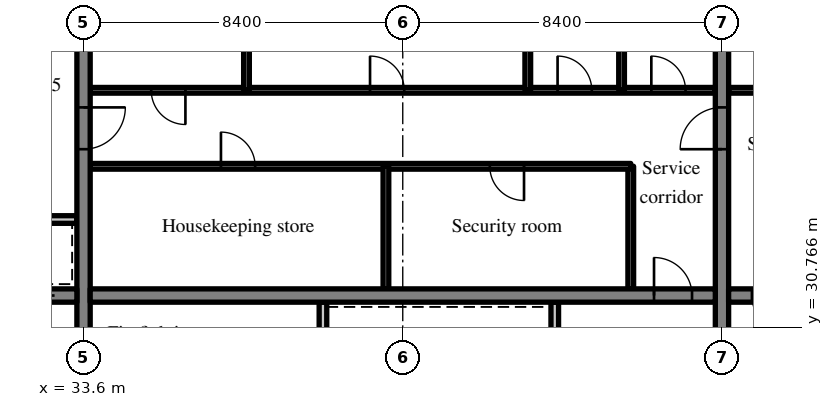
"""IFC4 building model, lengths in metres.
Left out: names, types, materials, properties, quantities, classifications, styles, units other than length and angle.
Written with IfcOpenShell. Run it as: python <this file> out.ifc"""

import sys

from ifc_helpers import new_model, si_unit, direction, frame, frame_2d, origin, place, context, subcontext, project, spatial, rectangle, extrude, source, transform, mapped, element, fill, save


model = new_model("IFC4")
c1 = context("Model", 3, precision=1e-05, world=origin(), true_north=direction((0.0, 1.0)))
c2 = subcontext(c1, "Body", "Model", "MODEL_VIEW")
j1 = project(units=[si_unit("LENGTHUNIT", "METRE"), si_unit("PLANEANGLEUNIT", "RADIAN")], contexts=[c1])
p1 = place(None, origin())
s1 = spatial("IfcSite", under=j1, at=p1, CompositionType="ELEMENT")
p2 = place(p1, origin())
s2 = spatial("IfcBuilding", under=s1, at=p2, CompositionType="ELEMENT")
p3 = place(p2, frame((0.0, 0.0, 229.6)))
s3 = spatial("IfcBuildingStorey", under=s2, at=p3, CompositionType="ELEMENT", Elevation=229.6)
m1 = source(origin(), c2, "Body", "SweptSolid", [
    extrude(rectangle(XDim=18.8, YDim=0.35, at=frame_2d((9.4, 0.0))), origin(), (0.0, 0.0, 1.0), 3.62),
])
p4 = place(p3, frame((33.6, 22.6, 0.0), z_axis=(0.0, 0.0, 1.0), x_axis=(0.0, 1.0, 0.0)))
e1 = element("IfcWall", 1, at=p4, inside=s3, PredefinedType="SHEAR", context=c2, shape_type="MappedRepresentation", body=[
    mapped(m1, transform((0.0, 0.0, 0.0), scale=1.0)),
])
m2 = source(origin(), c2, "Body", "SweptSolid", [
    extrude(rectangle(XDim=1.1, YDim=2.1, at=frame_2d((0.55, 1.05))), frame((0.0, 0.185, 0.0), z_axis=(0.0, -1.0, 0.0), x_axis=(1.0, 0.0, 0.0)), (0.0, 0.0, 1.0), 0.37),
])
p5 = place(p4, frame((12.85, 0.0, 0.0)))
e2 = element("IfcOpeningElement", 2, at=p5, cuts=e1, PredefinedType="OPENING", context=c2, shape_type="MappedRepresentation", body=[
    mapped(m2, transform((0.0, 0.0, 0.0), scale=1.0)),
])
p6 = place(p3, frame((50.4, 22.6, 0.0), z_axis=(0.0, 0.0, 1.0), x_axis=(0.0, 1.0, 0.0)))
e3 = element("IfcWall", 3, at=p6, inside=s3, PredefinedType="SHEAR", context=c2, shape_type="MappedRepresentation", body=[
    mapped(m1, transform((0.0, 0.0, 0.0), scale=1.0)),
])
p7 = place(p6, frame((12.85, 0.0, 0.0)))
e4 = element("IfcOpeningElement", 4, at=p7, cuts=e3, PredefinedType="OPENING", context=c2, shape_type="MappedRepresentation", body=[
    mapped(m2, transform((0.0, 0.0, 0.0), scale=1.0)),
])
m3 = source(origin(), c2, "Body", "SweptSolid", [
    extrude(rectangle(XDim=7.625, YDim=0.35, at=frame_2d((3.812, 0.0))), origin(), (0.0, 0.0, 1.0), 3.62),
])
p8 = place(p3, frame((25.8, 31.6, 0.0), z_axis=(0.0, 0.0, 1.0), x_axis=(1.0, 0.0, 0.0)))
e5 = element("IfcWall", 5, at=p8, inside=s3, PredefinedType="SHEAR", context=c2, shape_type="MappedRepresentation", body=[
    mapped(m3, transform((0.0, 0.0, 0.0), scale=1.0)),
])
p9 = place(p8, frame((5.938, 0.0, 0.0)))
e6 = element("IfcOpeningElement", 6, at=p9, cuts=e5, PredefinedType="OPENING", context=c2, shape_type="MappedRepresentation", body=[
    mapped(m2, transform((0.0, 0.0, 0.0), scale=1.0)),
])
m4 = source(origin(), c2, "Body", "SweptSolid", [
    extrude(rectangle(XDim=16.45, YDim=0.35, at=frame_2d((8.225, 0.0))), origin(), (0.0, 0.0, 1.0), 3.62),
])
p10 = place(p3, frame((33.775, 31.6, 0.0), z_axis=(0.0, 0.0, 1.0), x_axis=(1.0, 0.0, 0.0)))
e7 = element("IfcWall", 7, at=p10, inside=s3, PredefinedType="SHEAR", context=c2, shape_type="MappedRepresentation", body=[
    mapped(m4, transform((0.0, 0.0, 0.0), scale=1.0)),
])
m5 = source(origin(), c2, "Body", "SweptSolid", [
    extrude(rectangle(XDim=1.0, YDim=2.1, at=frame_2d((0.5, 1.05))), frame((0.0, 0.185, 0.0), z_axis=(0.0, -1.0, 0.0), x_axis=(1.0, 0.0, 0.0)), (0.0, 0.0, 1.0), 0.37),
])
p11 = place(p10, frame((14.837, 0.0, 0.0)))
e8 = element("IfcOpeningElement", 8, at=p11, cuts=e7, PredefinedType="OPENING", context=c2, shape_type="MappedRepresentation", body=[
    mapped(m5, transform((0.0, 0.0, 0.0), scale=1.0)),
])
m6 = source(origin(), c2, "Body", "SweptSolid", [
    extrude(rectangle(XDim=16.45, YDim=0.35, at=frame_2d((8.225, 0.0))), origin(), (0.0, 0.0, 1.0), 3.62),
])
p12 = place(p3, frame((50.575, 31.6, 0.0), z_axis=(0.0, 0.0, 1.0), x_axis=(1.0, 0.0, 0.0)))
e9 = element("IfcWall", 9, at=p12, inside=s3, PredefinedType="SHEAR", context=c2, shape_type="MappedRepresentation", body=[
    mapped(m6, transform((0.0, 0.0, 0.0), scale=1.0)),
])
p13 = place(p12, frame((0.613, 0.0, 0.0)))
e10 = element("IfcOpeningElement", 10, at=p13, cuts=e9, PredefinedType="OPENING", context=c2, shape_type="MappedRepresentation", body=[
    mapped(m5, transform((0.0, 0.0, 0.0), scale=1.0)),
])
m7 = source(origin(), c2, "Body", "SweptSolid", [
    extrude(rectangle(XDim=8.825, YDim=0.2, at=frame_2d((4.413, 0.0))), origin(), (0.0, 0.0, 1.0), 3.62),
])
p14 = place(p3, frame((39.9, 22.6, 0.0), z_axis=(0.0, 0.0, 1.0), x_axis=(0.0, 1.0, 0.0)))
e11 = element("IfcWall", 11, at=p14, inside=s3, PredefinedType="PARTITIONING", context=c2, shape_type="MappedRepresentation", body=[
    mapped(m7, transform((0.0, 0.0, 0.0), scale=1.0)),
])
m8 = source(origin(), c2, "Body", "SweptSolid", [
    extrude(rectangle(XDim=0.9, YDim=2.1, at=frame_2d((0.45, 1.05))), frame((0.0, 0.11, 0.0), z_axis=(0.0, -1.0, 0.0), x_axis=(1.0, 0.0, 0.0)), (0.0, 0.0, 1.0), 0.22),
])
p15 = place(p14, frame((4.95, 0.0, 0.0)))
e12 = element("IfcOpeningElement", 12, at=p15, cuts=e11, PredefinedType="OPENING", context=c2, shape_type="MappedRepresentation", body=[
    mapped(m8, transform((0.0, 0.0, 0.0), scale=1.0)),
])
m9 = source(origin(), c2, "Body", "SweptSolid", [
    extrude(rectangle(XDim=2.625, YDim=0.2, at=frame_2d((1.312, 0.0))), origin(), (0.0, 0.0, 1.0), 3.62),
])
p16 = place(p3, frame((46.0, 28.8, 0.0), z_axis=(0.0, 0.0, 1.0), x_axis=(0.0, 1.0, 0.0)))
e13 = element("IfcWall", 13, at=p16, inside=s3, PredefinedType="SOLIDWALL", context=c2, shape_type="MappedRepresentation", body=[
    mapped(m9, transform((0.0, 0.0, 0.0), scale=1.0)),
])
m10 = source(origin(), c2, "Body", "SweptSolid", [
    extrude(rectangle(XDim=3.225, YDim=0.15, at=frame_2d((1.613, 0.0))), origin(), (0.0, 0.0, 1.0), 3.62),
])
p17 = place(p3, frame((48.0, 31.775, 0.0), z_axis=(0.0, 0.0, 1.0), x_axis=(0.0, 1.0, 0.0)))
e14 = element("IfcWall", 14, at=p17, inside=s3, PredefinedType="PARTITIONING", context=c2, shape_type="MappedRepresentation", body=[
    mapped(m10, transform((0.0, 0.0, 0.0), scale=1.0)),
])
m11 = source(origin(), c2, "Body", "SweptSolid", [
    extrude(rectangle(XDim=14.225, YDim=0.15, at=frame_2d((7.113, 0.0))), origin(), (0.0, 0.0, 1.0), 3.62),
])
p18 = place(p3, frame((33.775, 35.0, 0.0), z_axis=(0.0, 0.0, 1.0), x_axis=(1.0, 0.0, 0.0)))
e15 = element("IfcWall", 15, at=p18, inside=s3, PredefinedType="PARTITIONING", context=c2, shape_type="MappedRepresentation", body=[
    mapped(m11, transform((0.0, 0.0, 0.0), scale=1.0)),
])
m12 = source(origin(), c2, "Body", "SweptSolid", [
    extrude(rectangle(XDim=0.9, YDim=2.1, at=frame_2d((0.45, 1.05))), frame((0.0, 0.085, 0.0), z_axis=(0.0, -1.0, 0.0), x_axis=(1.0, 0.0, 0.0)), (0.0, 0.0, 1.0), 0.17),
])
p19 = place(p18, frame((3.441, 0.0, 0.0)))
e16 = element("IfcOpeningElement", 16, at=p19, cuts=e15, PredefinedType="OPENING", context=c2, shape_type="MappedRepresentation", body=[
    mapped(m12, transform((0.0, 0.0, 0.0), scale=1.0)),
])
p20 = place(p18, frame((10.516, 0.0, 0.0)))
e17 = element("IfcOpeningElement", 17, at=p20, cuts=e15, PredefinedType="OPENING", context=c2, shape_type="MappedRepresentation", body=[
    mapped(m12, transform((0.0, 0.0, 0.0), scale=1.0)),
])
m13 = source(origin(), c2, "Body", "SweptSolid", [
    extrude(rectangle(XDim=16.45, YDim=0.15, at=frame_2d((8.225, 0.0))), origin(), (0.0, 0.0, 1.0), 3.62),
])
p21 = place(p3, frame((33.775, 37.0, 0.0), z_axis=(0.0, 0.0, 1.0), x_axis=(1.0, 0.0, 0.0)))
e18 = element("IfcWall", 18, at=p21, inside=s3, PredefinedType="PARTITIONING", context=c2, shape_type="MappedRepresentation", body=[
    mapped(m13, transform((0.0, 0.0, 0.0), scale=1.0)),
])
p22 = place(p21, frame((1.606, 0.0, 0.0)))
e19 = element("IfcOpeningElement", 19, at=p22, cuts=e18, PredefinedType="OPENING", context=c2, shape_type="MappedRepresentation", body=[
    mapped(m12, transform((0.0, 0.0, 0.0), scale=1.0)),
])
p23 = place(p21, frame((7.364, 0.0, 0.0)))
e20 = element("IfcOpeningElement", 20, at=p23, cuts=e18, PredefinedType="OPENING", context=c2, shape_type="MappedRepresentation", body=[
    mapped(m12, transform((0.0, 0.0, 0.0), scale=1.0)),
])
p24 = place(p21, frame((12.299, 0.0, 0.0)))
e21 = element("IfcOpeningElement", 21, at=p24, cuts=e18, PredefinedType="OPENING", context=c2, shape_type="MappedRepresentation", body=[
    mapped(m12, transform((0.0, 0.0, 0.0), scale=1.0)),
])
p25 = place(p21, frame((14.766, 0.0, 0.0)))
e22 = element("IfcOpeningElement", 22, at=p25, cuts=e18, PredefinedType="OPENING", context=c2, shape_type="MappedRepresentation", body=[
    mapped(m12, transform((0.0, 0.0, 0.0), scale=1.0)),
])
p26 = place(p3, frame((41.557, 31.775, 0.0), z_axis=(0.0, 0.0, 1.0), x_axis=(0.0, 1.0, 0.0)))
e23 = element("IfcWall", 23, at=p26, inside=s3, PredefinedType="PARTITIONING", context=c2, shape_type="MappedRepresentation", body=[
    mapped(m10, transform((0.0, 0.0, 0.0), scale=1.0)),
])
m14 = source(origin(), c2, "Body", "SweptSolid", [
    extrude(rectangle(XDim=4.4, YDim=0.15, at=frame_2d((2.2, 0.0))), origin(), (0.0, 0.0, 1.0), 3.62),
])
for number, where, z_axis, x_axis in (
    (24, (37.888, 37.0, 0.0), (0.0, 0.0, 1.0), (0.0, 1.0, 0.0)),
    (25, (45.29, 37.0, 0.0), (0.0, 0.0, 1.0), (0.0, 1.0, 0.0)),
    (26, (47.758, 37.0, 0.0), (0.0, 0.0, 1.0), (0.0, 1.0, 0.0)),
):
    element("IfcWall", number, at=place(p3, frame(where, z_axis=z_axis, x_axis=x_axis)), inside=s3, PredefinedType="PARTITIONING", context=c2, shape_type="MappedRepresentation", body=[
        mapped(m14, transform((0.0, 0.0, 0.0), scale=1.0)),
    ])
m15 = source(origin(), c2, "Body", "SweptSolid", [
    extrude(rectangle(XDim=16.45, YDim=0.15, at=frame_2d((8.225, 0.0))), origin(), (0.0, 0.0, 1.0), 3.62),
])
p27 = place(p3, frame((67.025, 37.0, 0.0), z_axis=(0.0, 0.0, 1.0), x_axis=(-1.0, 0.0, 0.0)))
e27 = element("IfcWall", 27, at=p27, inside=s3, PredefinedType="PARTITIONING", context=c2, shape_type="MappedRepresentation", body=[
    mapped(m15, transform((0.0, 0.0, 0.0), scale=1.0)),
])
p28 = place(p27, frame((3.251, 0.0, 0.0)))
e28 = element("IfcOpeningElement", 28, at=p28, cuts=e27, PredefinedType="OPENING", context=c2, shape_type="MappedRepresentation", body=[
    mapped(m12, transform((0.0, 0.0, 0.0), scale=1.0)),
])
p29 = place(p27, frame((8.186, 0.0, 0.0)))
e29 = element("IfcOpeningElement", 29, at=p29, cuts=e27, PredefinedType="OPENING", context=c2, shape_type="MappedRepresentation", body=[
    mapped(m12, transform((0.0, 0.0, 0.0), scale=1.0)),
])
p30 = place(p27, frame((11.476, 0.0, 0.0)))
e30 = element("IfcOpeningElement", 30, at=p30, cuts=e27, PredefinedType="OPENING", context=c2, shape_type="MappedRepresentation", body=[
    mapped(m12, transform((0.0, 0.0, 0.0), scale=1.0)),
])
p31 = place(p27, frame((14.766, 0.0, 0.0)))
e31 = element("IfcOpeningElement", 31, at=p31, cuts=e27, PredefinedType="OPENING", context=c2, shape_type="MappedRepresentation", body=[
    mapped(m12, transform((0.0, 0.0, 0.0), scale=1.0)),
])
m16 = source(origin(), c2, "Body", "SweptSolid", [
    extrude(rectangle(XDim=2.275, YDim=0.2, at=frame_2d((1.138, 0.0))), origin(), (0.0, 0.0, 1.0), 3.62),
])
p32 = place(p3, frame((31.15, 33.6, 0.0), z_axis=(0.0, 0.0, 1.0), x_axis=(1.0, 0.0, 0.0)))
e32 = element("IfcWall", 32, at=p32, inside=s3, PredefinedType="SOLIDWALL", context=c2, shape_type="MappedRepresentation", body=[
    mapped(m16, transform((0.0, 0.0, 0.0), scale=1.0)),
])
m17 = source(origin(), c2, "Body", "SweptSolid", [
    extrude(rectangle(XDim=1.0, YDim=2.1, at=frame_2d((0.5, 1.05))), frame((0.0, 0.025, 0.0), z_axis=(0.0, -1.0, 0.0), x_axis=(1.0, 0.0, 0.0)), (0.0, 0.0, 1.0), 0.05),
])
p33 = place(p11, origin())
e33 = element("IfcDoor", 33, at=p33, inside=s3, OperationType="SINGLE_SWING_LEFT", PredefinedType="DOOR", context=c2, shape_type="MappedRepresentation", body=[
    mapped(m17, transform((0.0, 0.0, 0.0), scale=1.0)),
])
fill(e8, e33)
m18 = source(origin(), c2, "Body", "SweptSolid", [
    extrude(rectangle(XDim=0.9, YDim=2.1, at=frame_2d((0.45, 1.05))), frame((0.0, 0.025, 0.0), z_axis=(0.0, -1.0, 0.0), x_axis=(1.0, 0.0, 0.0)), (0.0, 0.0, 1.0), 0.05),
])
p34 = place(p19, origin())
e34 = element("IfcDoor", 34, at=p34, inside=s3, OperationType="SINGLE_SWING_LEFT", PredefinedType="DOOR", context=c2, shape_type="MappedRepresentation", body=[
    mapped(m18, transform((0.0, 0.0, 0.0), scale=1.0)),
])
fill(e16, e34)
p35 = place(p20, origin())
e35 = element("IfcDoor", 35, at=p35, inside=s3, OperationType="SINGLE_SWING_RIGHT", PredefinedType="DOOR", context=c2, shape_type="MappedRepresentation", body=[
    mapped(m18, transform((0.0, 0.0, 0.0), scale=1.0)),
])
fill(e17, e35)
p36 = place(p22, origin())
e36 = element("IfcDoor", 36, at=p36, inside=s3, OperationType="SINGLE_SWING_RIGHT", PredefinedType="DOOR", context=c2, shape_type="MappedRepresentation", body=[
    mapped(m18, transform((0.0, 0.0, 0.0), scale=1.0)),
])
fill(e19, e36)
p37 = place(p23, origin())
e37 = element("IfcDoor", 37, at=p37, inside=s3, OperationType="SINGLE_SWING_LEFT", PredefinedType="DOOR", context=c2, shape_type="MappedRepresentation", body=[
    mapped(m18, transform((0.0, 0.0, 0.0), scale=1.0)),
])
fill(e20, e37)
p38 = place(p24, origin())
e38 = element("IfcDoor", 38, at=p38, inside=s3, OperationType="SINGLE_SWING_LEFT", PredefinedType="DOOR", context=c2, shape_type="MappedRepresentation", body=[
    mapped(m18, transform((0.0, 0.0, 0.0), scale=1.0)),
])
fill(e21, e38)
p39 = place(p25, origin())
e39 = element("IfcDoor", 39, at=p39, inside=s3, OperationType="SINGLE_SWING_LEFT", PredefinedType="DOOR", context=c2, shape_type="MappedRepresentation", body=[
    mapped(m18, transform((0.0, 0.0, 0.0), scale=1.0)),
])
fill(e22, e39)
p40 = place(p13, origin())
e40 = element("IfcDoor", 40, at=p40, inside=s3, OperationType="SINGLE_SWING_RIGHT", PredefinedType="DOOR", context=c2, shape_type="MappedRepresentation", body=[
    mapped(m17, transform((0.0, 0.0, 0.0), scale=1.0)),
])
fill(e10, e40)
m19 = source(origin(), c2, "Body", "SweptSolid", [
    extrude(rectangle(XDim=1.1, YDim=2.1, at=frame_2d((0.55, 1.05))), frame((0.0, 0.025, 0.0), z_axis=(0.0, -1.0, 0.0), x_axis=(1.0, 0.0, 0.0)), (0.0, 0.0, 1.0), 0.05),
])
p41 = place(p9, origin())
e41 = element("IfcDoor", 41, at=p41, inside=s3, OperationType="SLIDING_TO_LEFT", PredefinedType="DOOR", context=c2, shape_type="MappedRepresentation", body=[
    mapped(m19, transform((0.0, 0.0, 0.0), scale=1.0)),
])
fill(e6, e41)
p42 = place(p5, origin())
e42 = element("IfcDoor", 42, at=p42, inside=s3, OperationType="SINGLE_SWING_RIGHT", PredefinedType="DOOR", context=c2, shape_type="MappedRepresentation", body=[
    mapped(m19, transform((0.0, 0.0, 0.0), scale=1.0)),
])
fill(e2, e42)
p43 = place(p7, origin())
e43 = element("IfcDoor", 43, at=p43, inside=s3, OperationType="SINGLE_SWING_LEFT", PredefinedType="DOOR", context=c2, shape_type="MappedRepresentation", body=[
    mapped(m19, transform((0.0, 0.0, 0.0), scale=1.0)),
])
fill(e4, e43)
save(model, sys.argv[1])
